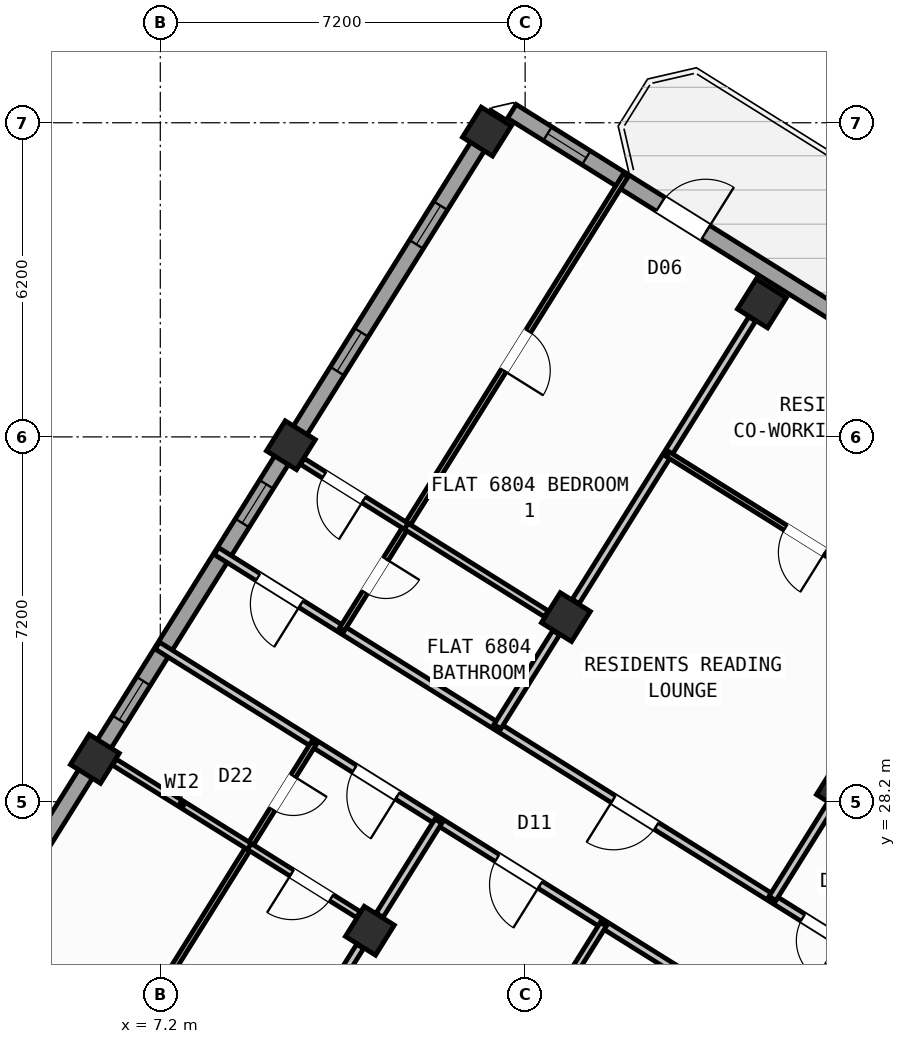
"""IFC4 building model, lengths in metres.
Left out: names, types, materials, properties, quantities, classifications, styles, units other than length and angle.
Written with IfcOpenShell. Run it as: python <this file> out.ifc"""

import sys

from ifc_helpers import new_model, si_unit, direction, frame, frame_2d, origin, origin_2d, place, context, subcontext, project, spatial, rectangle, hollow_rectangle, extrude, source, transform, mapped, element, fill, save


model = new_model("IFC4")
c1 = context("Model", 3, precision=1e-05, world=origin(), true_north=direction((0.0, 1.0)))
c2 = subcontext(c1, "Body", "Model", "MODEL_VIEW")
j1 = project(units=[si_unit("LENGTHUNIT", "METRE"), si_unit("PLANEANGLEUNIT", "RADIAN")], contexts=[c1])
p1 = place(None, origin())
s1 = spatial("IfcSite", under=j1, at=p1, CompositionType="ELEMENT")
p2 = place(p1, origin())
s2 = spatial("IfcBuilding", under=s1, at=p2, CompositionType="ELEMENT")
p3 = place(p2, frame((0.0, 0.0, 270.0)))
s3 = spatial("IfcBuildingStorey", under=s2, at=p3, CompositionType="ELEMENT", Elevation=270.0)
m1 = source(origin(), c2, "Body", "SweptSolid", [
    extrude(hollow_rectangle(XDim=0.7, YDim=0.7, WallThickness=0.028, at=origin_2d()), origin(), (0.0, 0.0, 1.0), 3.6),
])
for number, where, z_axis, x_axis in (
    (1, (20.632, 28.452, 0.0), (0.0, 0.0, 1.0), (-0.848, 0.53, 0.0)),
    (2, (19.073, 38.034, 0.0), (0.0, 0.0, 1.0), (-0.848, 0.53, 0.0)),
    (3, (15.205, 31.844, 0.0), (0.0, 0.0, 1.0), (-0.848, 0.53, 0.0)),
    (4, (11.336, 25.653, 0.0), (0.0, 0.0, 1.0), (-0.848, 0.53, 0.0)),
    (5, (13.646, 41.426, 0.0), (0.0, 0.0, 1.0), (-0.848, 0.53, 0.0)),
    (6, (9.777, 35.235, 0.0), (0.0, 0.0, 1.0), (-0.848, 0.53, 0.0)),
    (7, (5.909, 29.044, 0.0), (0.0, 0.0, 1.0), (-0.848, 0.53, 0.0)),
):
    element("IfcColumn", number, at=place(p3, frame(where, z_axis=z_axis, x_axis=x_axis)), inside=s3, PredefinedType="COLUMN", context=c2, shape_type="MappedRepresentation", body=[
        mapped(m1, transform((0.0, 0.0, 0.0), scale=1.0)),
    ])
p4 = place(p3, frame((2.415, 23.452, 0.0), z_axis=(0.0, 0.0, 1.0), x_axis=(0.52991049553, 0.848053575387, 0.0)))
e8 = element("IfcWall", 8, at=p4, inside=s3, PredefinedType="STANDARD", context=c2, shape_type="SweptSolid", body=[
    extrude(rectangle(XDim=21.587, YDim=0.32, at=frame_2d((10.794, 0.0))), origin(), (0.0, 0.0, 1.0), 2.875),
])
p5 = place(p4, frame((2.606, 0.0, 0.9)))
e9 = element("IfcOpeningElement", 9, at=p5, cuts=e8, PredefinedType="OPENING", context=c2, shape_type="SweptSolid", body=[
    extrude(rectangle(XDim=1.65, YDim=1.45, at=frame_2d((0.825, 0.725))), frame((0.0, 0.17, 0.0), z_axis=(0.0, -1.0, 0.0), x_axis=(1.0, 0.0, 0.0)), (0.0, 0.0, 1.0), 0.34),
])
p6 = place(p4, frame((7.504, 0.0, 1.0)))
e10 = element("IfcOpeningElement", 10, at=p6, cuts=e8, PredefinedType="OPENING", context=c2, shape_type="SweptSolid", body=[
    extrude(rectangle(XDim=0.9, YDim=1.25, at=frame_2d((0.45, 0.625))), frame((0.0, 0.17, 0.0), z_axis=(0.0, -1.0, 0.0), x_axis=(1.0, 0.0, 0.0)), (0.0, 0.0, 1.0), 0.34),
])
p7 = place(p4, frame((12.084, 0.0, 1.0)))
e11 = element("IfcOpeningElement", 11, at=p7, cuts=e8, PredefinedType="OPENING", context=c2, shape_type="SweptSolid", body=[
    extrude(rectangle(XDim=0.9, YDim=1.25, at=frame_2d((0.45, 0.625))), frame((0.0, 0.17, 0.0), z_axis=(0.0, -1.0, 0.0), x_axis=(1.0, 0.0, 0.0)), (0.0, 0.0, 1.0), 0.34),
])
p8 = place(p4, frame((15.619, 0.0, 1.0)))
e12 = element("IfcOpeningElement", 12, at=p8, cuts=e8, PredefinedType="OPENING", context=c2, shape_type="SweptSolid", body=[
    extrude(rectangle(XDim=0.9, YDim=1.25, at=frame_2d((0.45, 0.625))), frame((0.0, 0.17, 0.0), z_axis=(0.0, -1.0, 0.0), x_axis=(1.0, 0.0, 0.0)), (0.0, 0.0, 1.0), 0.34),
])
p9 = place(p4, frame((18.569, 0.0, 1.0)))
e13 = element("IfcOpeningElement", 13, at=p9, cuts=e8, PredefinedType="OPENING", context=c2, shape_type="SweptSolid", body=[
    extrude(rectangle(XDim=0.9, YDim=1.25, at=frame_2d((0.45, 0.625))), frame((0.0, 0.17, 0.0), z_axis=(0.0, -1.0, 0.0), x_axis=(1.0, 0.0, 0.0)), (0.0, 0.0, 1.0), 0.34),
])
p10 = place(p3, frame((14.138, 41.825, 0.0), z_axis=(0.0, 0.0, 1.0), x_axis=(0.848046498049, -0.529921821731, 0.0)))
e14 = element("IfcWall", 14, at=p10, inside=s3, PredefinedType="STANDARD", context=c2, shape_type="SweptSolid", body=[
    extrude(rectangle(XDim=31.588, YDim=0.32, at=frame_2d((15.794, 0.0))), origin(), (0.0, 0.0, 1.0), 3.35),
])
p11 = place(p10, frame((3.46, 0.0, 0.0)))
e15 = element("IfcOpeningElement", 15, at=p11, cuts=e14, PredefinedType="OPENING", context=c2, shape_type="SweptSolid", body=[
    extrude(rectangle(XDim=1.05, YDim=2.15, at=frame_2d((0.525, 1.075))), frame((0.0, 0.17, 0.0), z_axis=(0.0, -1.0, 0.0), x_axis=(1.0, 0.0, 0.0)), (0.0, 0.0, 1.0), 0.34),
])
p12 = place(p10, frame((0.831, 0.0, 1.0)))
e16 = element("IfcOpeningElement", 16, at=p12, cuts=e14, PredefinedType="OPENING", context=c2, shape_type="SweptSolid", body=[
    extrude(rectangle(XDim=0.9, YDim=1.25, at=frame_2d((0.45, 0.625))), frame((0.0, 0.17, 0.0), z_axis=(0.0, -1.0, 0.0), x_axis=(1.0, 0.0, 0.0)), (0.0, 0.0, 1.0), 0.34),
])
p13 = place(p10, frame((8.719, 0.0, 0.9)))
e17 = element("IfcOpeningElement", 17, at=p13, cuts=e14, PredefinedType="OPENING", context=c2, shape_type="SweptSolid", body=[
    extrude(rectangle(XDim=1.35, YDim=1.45, at=frame_2d((0.675, 0.725))), frame((0.0, 0.17, 0.0), z_axis=(0.0, -1.0, 0.0), x_axis=(1.0, 0.0, 0.0)), (0.0, 0.0, 1.0), 0.34),
])
p14 = place(p10, frame((13.599, 0.0, 0.95)))
e18 = element("IfcOpeningElement", 18, at=p14, cuts=e14, PredefinedType="OPENING", context=c2, shape_type="SweptSolid", body=[
    extrude(rectangle(XDim=1.95, YDim=1.35, at=frame_2d((0.975, 0.675))), frame((0.0, 0.17, 0.0), z_axis=(0.0, -1.0, 0.0), x_axis=(1.0, 0.0, 0.0)), (0.0, 0.0, 1.0), 0.34),
])
p15 = place(p10, frame((17.154, 0.0, 1.0)))
e19 = element("IfcOpeningElement", 19, at=p15, cuts=e14, PredefinedType="OPENING", context=c2, shape_type="SweptSolid", body=[
    extrude(rectangle(XDim=0.9, YDim=1.25, at=frame_2d((0.45, 0.625))), frame((0.0, 0.17, 0.0), z_axis=(0.0, -1.0, 0.0), x_axis=(1.0, 0.0, 0.0)), (0.0, 0.0, 1.0), 0.34),
])
p16 = place(p10, frame((21.719, 0.0, 0.9)))
e20 = element("IfcOpeningElement", 20, at=p16, cuts=e14, PredefinedType="OPENING", context=c2, shape_type="SweptSolid", body=[
    extrude(rectangle(XDim=1.65, YDim=1.45, at=frame_2d((0.825, 0.725))), frame((0.0, 0.17, 0.0), z_axis=(0.0, -1.0, 0.0), x_axis=(1.0, 0.0, 0.0)), (0.0, 0.0, 1.0), 0.34),
])
p17 = place(p10, frame((27.419, 0.0, 0.9)))
e21 = element("IfcOpeningElement", 21, at=p17, cuts=e14, PredefinedType="OPENING", context=c2, shape_type="SweptSolid", body=[
    extrude(rectangle(XDim=1.65, YDim=1.45, at=frame_2d((0.825, 0.725))), frame((0.0, 0.17, 0.0), z_axis=(0.0, -1.0, 0.0), x_axis=(1.0, 0.0, 0.0)), (0.0, 0.0, 1.0), 0.34),
])
p18 = place(p3, frame((22.495, 24.281, 0.0), z_axis=(0.0, 0.0, 1.0), x_axis=(-0.848052408131, 0.529912363569, 0.0)))
e22 = element("IfcWall", 22, at=p18, inside=s3, PredefinedType="PARTITIONING", context=c2, shape_type="SweptSolid", body=[
    extrude(rectangle(XDim=16.73, YDim=0.16, at=frame_2d((8.365, 0.0))), origin(), (0.0, 0.0, 1.0), 3.34),
])
p19 = place(p18, frame((2.22, 0.0, 0.0)))
e23 = element("IfcOpeningElement", 23, at=p19, cuts=e22, PredefinedType="OPENING", context=c2, shape_type="SweptSolid", body=[
    extrude(rectangle(XDim=0.86, YDim=2.05, at=frame_2d((0.43, 1.025))), frame((0.0, 0.09, 0.0), z_axis=(0.0, -1.0, 0.0), x_axis=(1.0, 0.0, 0.0)), (0.0, 0.0, 1.0), 0.18),
])
p20 = place(p18, frame((6.49, 0.0, 0.0)))
e24 = element("IfcOpeningElement", 24, at=p20, cuts=e22, PredefinedType="OPENING", context=c2, shape_type="SweptSolid", body=[
    extrude(rectangle(XDim=1.0, YDim=2.1, at=frame_2d((0.5, 1.05))), frame((0.0, 0.09, 0.0), z_axis=(0.0, -1.0, 0.0), x_axis=(1.0, 0.0, 0.0)), (0.0, 0.0, 1.0), 0.18),
])
p21 = place(p18, frame((14.76, 0.0, 0.0)))
e25 = element("IfcOpeningElement", 25, at=p21, cuts=e22, PredefinedType="OPENING", context=c2, shape_type="SweptSolid", body=[
    extrude(rectangle(XDim=1.0, YDim=2.1, at=frame_2d((0.5, 1.05))), frame((0.0, 0.09, 0.0), z_axis=(0.0, -1.0, 0.0), x_axis=(1.0, 0.0, 0.0)), (0.0, 0.0, 1.0), 0.18),
])
p22 = place(p3, frame((21.329, 22.416, 0.0), z_axis=(0.0, 0.0, 1.0), x_axis=(-0.848052408131, 0.529912363569, 0.0)))
e26 = element("IfcWall", 26, at=p22, inside=s3, PredefinedType="PARTITIONING", context=c2, shape_type="SweptSolid", body=[
    extrude(rectangle(XDim=16.73, YDim=0.16, at=frame_2d((8.365, 0.0))), origin(), (0.0, 0.0, 1.0), 3.34),
])
p23 = place(p22, frame((1.395, 0.0, 0.0)))
e27 = element("IfcOpeningElement", 27, at=p23, cuts=e26, PredefinedType="OPENING", context=c2, shape_type="SweptSolid", body=[
    extrude(rectangle(XDim=1.0, YDim=2.1, at=frame_2d((0.5, 1.05))), frame((0.0, 0.09, 0.0), z_axis=(0.0, -1.0, 0.0), x_axis=(1.0, 0.0, 0.0)), (0.0, 0.0, 1.0), 0.18),
])
p24 = place(p22, frame((7.82, 0.0, 0.0)))
e28 = element("IfcOpeningElement", 28, at=p24, cuts=e26, PredefinedType="OPENING", context=c2, shape_type="SweptSolid", body=[
    extrude(rectangle(XDim=1.0, YDim=2.1, at=frame_2d((0.5, 1.05))), frame((0.0, 0.09, 0.0), z_axis=(0.0, -1.0, 0.0), x_axis=(1.0, 0.0, 0.0)), (0.0, 0.0, 1.0), 0.18),
])
p25 = place(p22, frame((11.14, 0.0, 0.0)))
e29 = element("IfcOpeningElement", 29, at=p25, cuts=e26, PredefinedType="OPENING", context=c2, shape_type="SweptSolid", body=[
    extrude(rectangle(XDim=1.0, YDim=2.1, at=frame_2d((0.5, 1.05))), frame((0.0, 0.09, 0.0), z_axis=(0.0, -1.0, 0.0), x_axis=(1.0, 0.0, 0.0)), (0.0, 0.0, 1.0), 0.18),
])
p26 = place(p3, frame((12.688, 27.815, 0.0), z_axis=(0.0, 0.0, 1.0), x_axis=(-0.52994879608, -0.848029641896, 0.0)))
e30 = element("IfcWall", 30, at=p26, inside=s3, PredefinedType="PARTITIONING", context=c2, shape_type="SweptSolid", body=[
    extrude(rectangle(XDim=2.188, YDim=0.16, at=frame_2d((1.094, 0.0))), origin(), (0.0, 0.0, 1.0), 2.875),
])
p27 = place(p3, frame((11.144, 25.346, 0.0), z_axis=(0.0, 0.0, 1.0), x_axis=(-0.529904903214, -0.848057069748, 0.0)))
e31 = element("IfcWall", 31, at=p27, inside=s3, PredefinedType="PARTITIONING", context=c2, shape_type="SweptSolid", body=[
    extrude(rectangle(XDim=5.601, YDim=0.16, at=frame_2d((2.801, 0.0))), origin(), (0.0, 0.0, 1.0), 2.875),
])
p28 = place(p3, frame((15.944, 25.781, 0.0), z_axis=(0.0, 0.0, 1.0), x_axis=(-0.529917480809, -0.848049210561, 0.0)))
e32 = element("IfcWall", 32, at=p28, inside=s3, PredefinedType="PLUMBINGWALL", context=c2, shape_type="SweptSolid", body=[
    extrude(rectangle(XDim=4.58, YDim=0.14, at=frame_2d((2.29, 0.0))), origin(), (0.0, 0.0, 1.0), 3.34),
])
p29 = place(p28, frame((1.9, 0.0, 0.0)))
e33 = element("IfcOpeningElement", 33, at=p29, cuts=e32, PredefinedType="OPENING", context=c2, shape_type="SweptSolid", body=[
    extrude(rectangle(XDim=0.78, YDim=2.05, at=frame_2d((0.39, 1.025))), frame((0.0, 0.08, 0.0), z_axis=(0.0, -1.0, 0.0), x_axis=(1.0, 0.0, 0.0)), (0.0, 0.0, 1.0), 0.16),
])
p30 = place(p3, frame((10.228, 29.352, 0.0), z_axis=(0.0, 0.0, 1.0), x_axis=(-0.529917830441, -0.848048992088, 0.0)))
e34 = element("IfcWall", 34, at=p30, inside=s3, PredefinedType="PARTITIONING", context=c2, shape_type="SweptSolid", body=[
    extrude(rectangle(XDim=9.47, YDim=0.11, at=frame_2d((4.735, 0.0))), origin(), (0.0, 0.0, 1.0), 3.34),
])
p31 = place(p30, frame((0.76, 0.0, 0.0)))
e35 = element("IfcOpeningElement", 35, at=p31, cuts=e34, PredefinedType="OPENING", context=c2, shape_type="SweptSolid", body=[
    extrude(rectangle(XDim=0.78, YDim=2.05, at=frame_2d((0.39, 1.025))), frame((0.0, 0.065, 0.0), z_axis=(0.0, -1.0, 0.0), x_axis=(1.0, 0.0, 0.0)), (0.0, 0.0, 1.0), 0.13),
])
p32 = place(p30, frame((5.475, 0.0, 0.0)))
e36 = element("IfcOpeningElement", 36, at=p32, cuts=e34, PredefinedType="OPENING", context=c2, shape_type="SweptSolid", body=[
    extrude(rectangle(XDim=0.92, YDim=2.08, at=frame_2d((0.46, 1.04))), frame((0.0, 0.065, 0.0), z_axis=(0.0, -1.0, 0.0), x_axis=(1.0, 0.0, 0.0)), (0.0, 0.0, 1.0), 0.13),
])
p33 = place(p3, frame((11.109, 25.972, 0.0), z_axis=(0.0, 0.0, 1.0), x_axis=(-0.848041534199, 0.529929765415, 0.0)))
e37 = element("IfcWall", 37, at=p33, inside=s3, PredefinedType="PLUMBINGWALL", context=c2, shape_type="SweptSolid", body=[
    extrude(rectangle(XDim=2.538, YDim=0.14, at=frame_2d((1.269, 0.0))), origin(), (0.0, 0.0, 1.0), 2.875),
])
p34 = place(p33, frame((0.628, 0.0, 0.0)))
e38 = element("IfcOpeningElement", 38, at=p34, cuts=e37, PredefinedType="OPENING", context=c2, shape_type="SweptSolid", body=[
    extrude(rectangle(XDim=0.92, YDim=2.08, at=frame_2d((0.46, 1.04))), frame((0.0, 0.08, 0.0), z_axis=(0.0, -1.0, 0.0), x_axis=(1.0, 0.0, 0.0)), (0.0, 0.0, 1.0), 0.16),
])
p35 = place(p3, frame((8.956, 27.317, 0.0), z_axis=(0.0, 0.0, 1.0), x_axis=(-0.848050751193, 0.529915015264, 0.0)))
e39 = element("IfcWall", 39, at=p35, inside=s3, PredefinedType="PLUMBINGWALL", context=c2, shape_type="SweptSolid", body=[
    extrude(rectangle(XDim=3.138, YDim=0.14, at=frame_2d((1.569, 0.0))), origin(), (0.0, 0.0, 1.0), 2.875),
])
p36 = place(p3, frame((20.44, 28.145, 0.0), z_axis=(0.0, 0.0, 1.0), x_axis=(-0.5299186965, -0.848048450915, 0.0)))
e40 = element("IfcWall", 40, at=p36, inside=s3, PredefinedType="PARTITIONING", context=c2, shape_type="SweptSolid", body=[
    extrude(rectangle(XDim=2.188, YDim=0.16, at=frame_2d((1.094, 0.0))), origin(), (0.0, 0.0, 1.0), 2.875),
])
p37 = place(p3, frame((18.881, 37.727, 0.0), z_axis=(0.0, 0.0, 1.0), x_axis=(-0.529938869374, -0.84803584519, 0.0)))
e41 = element("IfcWall", 41, at=p37, inside=s3, PredefinedType="PARTITIONING", context=c2, shape_type="SweptSolid", body=[
    extrude(rectangle(XDim=6.576, YDim=0.16, at=frame_2d((3.288, 0.0))), origin(), (0.0, 0.0, 1.0), 2.875),
])
p38 = place(p3, frame((15.013, 31.537, 0.0), z_axis=(0.0, 0.0, 1.0), x_axis=(-0.5299186965, -0.848048450915, 0.0)))
e42 = element("IfcWall", 42, at=p38, inside=s3, PredefinedType="PARTITIONING", context=c2, shape_type="SweptSolid", body=[
    extrude(rectangle(XDim=2.188, YDim=0.16, at=frame_2d((1.094, 0.0))), origin(), (0.0, 0.0, 1.0), 2.875),
])
p39 = place(p3, frame((22.642, 31.668, 0.0), z_axis=(0.0, 0.0, 1.0), x_axis=(-0.84806687439, 0.529889211593, 0.0)))
e43 = element("IfcWall", 43, at=p39, inside=s3, PredefinedType="PARTITIONING", context=c2, shape_type="SweptSolid", body=[
    extrude(rectangle(XDim=6.4, YDim=0.11, at=frame_2d((3.2, 0.0))), origin(), (0.0, 0.0, 1.0), 3.34),
])
p40 = place(p39, frame((2.74, 0.0, 0.0)))
e44 = element("IfcOpeningElement", 44, at=p40, cuts=e43, PredefinedType="OPENING", context=c2, shape_type="SweptSolid", body=[
    extrude(rectangle(XDim=0.92, YDim=2.08, at=frame_2d((0.46, 1.04))), frame((0.0, 0.065, 0.0), z_axis=(0.0, -1.0, 0.0), x_axis=(1.0, 0.0, 0.0)), (0.0, 0.0, 1.0), 0.13),
])
p41 = place(p3, frame((16.385, 40.563, 0.0), z_axis=(0.0, 0.0, 1.0), x_axis=(-0.529924195719, -0.848045014602, 0.0)))
e45 = element("IfcWall", 45, at=p41, inside=s3, PredefinedType="PARTITIONING", context=c2, shape_type="SweptSolid", body=[
    extrude(rectangle(XDim=10.57, YDim=0.11, at=frame_2d((5.285, 0.0))), origin(), (0.0, 0.0, 1.0), 3.34),
])
p42 = place(p41, frame((8.93, 0.0, 0.0)))
e46 = element("IfcOpeningElement", 46, at=p42, cuts=e45, PredefinedType="OPENING", context=c2, shape_type="SweptSolid", body=[
    extrude(rectangle(XDim=0.78, YDim=2.05, at=frame_2d((0.39, 1.025))), frame((0.0, 0.065, 0.0), z_axis=(0.0, -1.0, 0.0), x_axis=(1.0, 0.0, 0.0)), (0.0, 0.0, 1.0), 0.13),
])
p43 = place(p41, frame((3.625, 0.0, 0.0)))
e47 = element("IfcOpeningElement", 47, at=p43, cuts=e45, PredefinedType="OPENING", context=c2, shape_type="SweptSolid", body=[
    extrude(rectangle(XDim=0.92, YDim=2.08, at=frame_2d((0.46, 1.04))), frame((0.0, 0.065, 0.0), z_axis=(0.0, -1.0, 0.0), x_axis=(1.0, 0.0, 0.0)), (0.0, 0.0, 1.0), 0.13),
])
p44 = place(p3, frame((12.055, 33.635, 0.0), z_axis=(0.0, 0.0, 1.0), x_axis=(-0.848089044815, 0.529853727046, 0.0)))
e48 = element("IfcWall", 48, at=p44, inside=s3, PredefinedType="PLUMBINGWALL", context=c2, shape_type="SweptSolid", body=[
    extrude(rectangle(XDim=2.418, YDim=0.14, at=frame_2d((1.209, 0.0))), origin(), (0.0, 0.0, 1.0), 2.875),
])
p45 = place(p44, frame((0.99, 0.0, 0.0)))
e49 = element("IfcOpeningElement", 49, at=p45, cuts=e48, PredefinedType="OPENING", context=c2, shape_type="SweptSolid", body=[
    extrude(rectangle(XDim=0.92, YDim=2.08, at=frame_2d((0.46, 1.04))), frame((0.0, 0.08, 0.0), z_axis=(0.0, -1.0, 0.0), x_axis=(1.0, 0.0, 0.0)), (0.0, 0.0, 1.0), 0.16),
])
p46 = place(p3, frame((14.818, 31.908, 0.0), z_axis=(0.0, 0.0, 1.0), x_axis=(-0.848036190178, 0.529938317305, 0.0)))
e50 = element("IfcWall", 50, at=p46, inside=s3, PredefinedType="PLUMBINGWALL", context=c2, shape_type="SweptSolid", body=[
    extrude(rectangle(XDim=3.258, YDim=0.14, at=frame_2d((1.629, 0.0))), origin(), (0.0, 0.0, 1.0), 2.875),
])
m2 = source(origin(), c2, "Body", "SweptSolid", [
    extrude(rectangle(XDim=1.05, YDim=2.15, at=frame_2d((0.525, 1.075))), frame((0.0, 0.025, 0.0), z_axis=(0.0, -1.0, 0.0), x_axis=(1.0, 0.0, 0.0)), (0.0, 0.0, 1.0), 0.05),
])
p47 = place(p11, origin())
e51 = element("IfcDoor", 51, at=p47, inside=s3, OperationType="SINGLE_SWING_RIGHT", PredefinedType="DOOR", context=c2, shape_type="MappedRepresentation", body=[
    mapped(m2, transform((0.0, 0.0, 0.0), scale=1.0)),
])
fill(e15, e51)
m3 = source(origin(), c2, "Body", "SweptSolid", [
    extrude(rectangle(XDim=0.9, YDim=1.25, at=frame_2d((0.45, 0.625))), frame((0.0, 0.03, 0.0), z_axis=(0.0, -1.0, 0.0), x_axis=(1.0, 0.0, 0.0)), (0.0, 0.0, 1.0), 0.06),
])
p48 = place(p6, origin())
e52 = element("IfcWindow", 52, at=p48, inside=s3, PartitioningType="SINGLE_PANEL", PredefinedType="WINDOW", context=c2, shape_type="MappedRepresentation", body=[
    mapped(m3, transform((0.0, 0.0, 0.0), scale=1.0)),
])
fill(e10, e52)
p49 = place(p7, origin())
e53 = element("IfcWindow", 53, at=p49, inside=s3, PartitioningType="SINGLE_PANEL", PredefinedType="WINDOW", context=c2, shape_type="MappedRepresentation", body=[
    mapped(m3, transform((0.0, 0.0, 0.0), scale=1.0)),
])
fill(e11, e53)
p50 = place(p8, origin())
e54 = element("IfcWindow", 54, at=p50, inside=s3, PartitioningType="SINGLE_PANEL", PredefinedType="WINDOW", context=c2, shape_type="MappedRepresentation", body=[
    mapped(m3, transform((0.0, 0.0, 0.0), scale=1.0)),
])
fill(e12, e54)
p51 = place(p9, origin())
e55 = element("IfcWindow", 55, at=p51, inside=s3, PartitioningType="SINGLE_PANEL", PredefinedType="WINDOW", context=c2, shape_type="MappedRepresentation", body=[
    mapped(m3, transform((0.0, 0.0, 0.0), scale=1.0)),
])
fill(e13, e55)
p52 = place(p12, origin())
e56 = element("IfcWindow", 56, at=p52, inside=s3, PartitioningType="SINGLE_PANEL", PredefinedType="WINDOW", context=c2, shape_type="MappedRepresentation", body=[
    mapped(m3, transform((0.0, 0.0, 0.0), scale=1.0)),
])
fill(e16, e56)
m4 = source(origin(), c2, "Body", "SweptSolid", [
    extrude(rectangle(XDim=1.0, YDim=2.1, at=frame_2d((0.5, 1.05))), frame((0.0, 0.025, 0.0), z_axis=(0.0, -1.0, 0.0), x_axis=(1.0, 0.0, 0.0)), (0.0, 0.0, 1.0), 0.05),
])
p53 = place(p24, origin())
e57 = element("IfcDoor", 57, at=p53, inside=s3, OperationType="SINGLE_SWING_LEFT", PredefinedType="DOOR", context=c2, shape_type="MappedRepresentation", body=[
    mapped(m4, transform((0.0, 0.0, 0.0), scale=1.0)),
])
fill(e28, e57)
p54 = place(p25, origin())
e58 = element("IfcDoor", 58, at=p54, inside=s3, OperationType="SINGLE_SWING_LEFT", PredefinedType="DOOR", context=c2, shape_type="MappedRepresentation", body=[
    mapped(m4, transform((0.0, 0.0, 0.0), scale=1.0)),
])
fill(e29, e58)
m5 = source(origin(), c2, "Body", "SweptSolid", [
    extrude(rectangle(XDim=0.92, YDim=2.08, at=frame_2d((0.46, 1.04))), frame((0.0, 0.025, 0.0), z_axis=(0.0, -1.0, 0.0), x_axis=(1.0, 0.0, 0.0)), (0.0, 0.0, 1.0), 0.05),
])
p55 = place(p34, origin())
e59 = element("IfcDoor", 59, at=p55, inside=s3, OperationType="SINGLE_SWING_RIGHT", PredefinedType="DOOR", context=c2, shape_type="MappedRepresentation", body=[
    mapped(m5, transform((0.0, 0.0, 0.0), scale=1.0)),
])
fill(e38, e59)
m6 = source(origin(), c2, "Body", "SweptSolid", [
    extrude(rectangle(XDim=0.78, YDim=2.05, at=frame_2d((0.39, 1.025))), frame((0.0, 0.025, 0.0), z_axis=(0.0, -1.0, 0.0), x_axis=(1.0, 0.0, 0.0)), (0.0, 0.0, 1.0), 0.05),
])
p56 = place(p31, origin())
e60 = element("IfcDoor", 60, at=p56, inside=s3, OperationType="SINGLE_SWING_LEFT", PredefinedType="DOOR", context=c2, shape_type="MappedRepresentation", body=[
    mapped(m6, transform((0.0, 0.0, 0.0), scale=1.0)),
])
fill(e35, e60)
m7 = source(origin(), c2, "Body", "SweptSolid", [
    extrude(rectangle(XDim=0.86, YDim=2.05, at=frame_2d((0.43, 1.025))), frame((0.0, 0.025, 0.0), z_axis=(0.0, -1.0, 0.0), x_axis=(1.0, 0.0, 0.0)), (0.0, 0.0, 1.0), 0.05),
])
p57 = place(p19, origin())
e61 = element("IfcDoor", 61, at=p57, inside=s3, OperationType="SINGLE_SWING_LEFT", PredefinedType="DOOR", context=c2, shape_type="MappedRepresentation", body=[
    mapped(m7, transform((0.0, 0.0, 0.0), scale=1.0)),
])
fill(e23, e61)
p58 = place(p20, origin())
e62 = element("IfcDoor", 62, at=p58, inside=s3, OperationType="SINGLE_SWING_RIGHT", PredefinedType="DOOR", context=c2, shape_type="MappedRepresentation", body=[
    mapped(m4, transform((0.0, 0.0, 0.0), scale=1.0)),
])
fill(e24, e62)
p59 = place(p40, origin())
e63 = element("IfcDoor", 63, at=p59, inside=s3, OperationType="SINGLE_SWING_LEFT", PredefinedType="DOOR", context=c2, shape_type="MappedRepresentation", body=[
    mapped(m5, transform((0.0, 0.0, 0.0), scale=1.0)),
])
fill(e44, e63)
p60 = place(p21, origin())
e64 = element("IfcDoor", 64, at=p60, inside=s3, OperationType="SINGLE_SWING_LEFT", PredefinedType="DOOR", context=c2, shape_type="MappedRepresentation", body=[
    mapped(m4, transform((0.0, 0.0, 0.0), scale=1.0)),
])
fill(e25, e64)
p61 = place(p45, origin())
e65 = element("IfcDoor", 65, at=p61, inside=s3, OperationType="SINGLE_SWING_LEFT", PredefinedType="DOOR", context=c2, shape_type="MappedRepresentation", body=[
    mapped(m5, transform((0.0, 0.0, 0.0), scale=1.0)),
])
fill(e49, e65)
p62 = place(p42, origin())
e66 = element("IfcDoor", 66, at=p62, inside=s3, OperationType="SINGLE_SWING_LEFT", PredefinedType="DOOR", context=c2, shape_type="MappedRepresentation", body=[
    mapped(m6, transform((0.0, 0.0, 0.0), scale=1.0)),
])
fill(e46, e66)
p63 = place(p43, origin())
e67 = element("IfcDoor", 67, at=p63, inside=s3, OperationType="SINGLE_SWING_RIGHT", PredefinedType="DOOR", context=c2, shape_type="MappedRepresentation", body=[
    mapped(m5, transform((0.0, 0.0, 0.0), scale=1.0)),
])
fill(e47, e67)
save(model, sys.argv[1])
